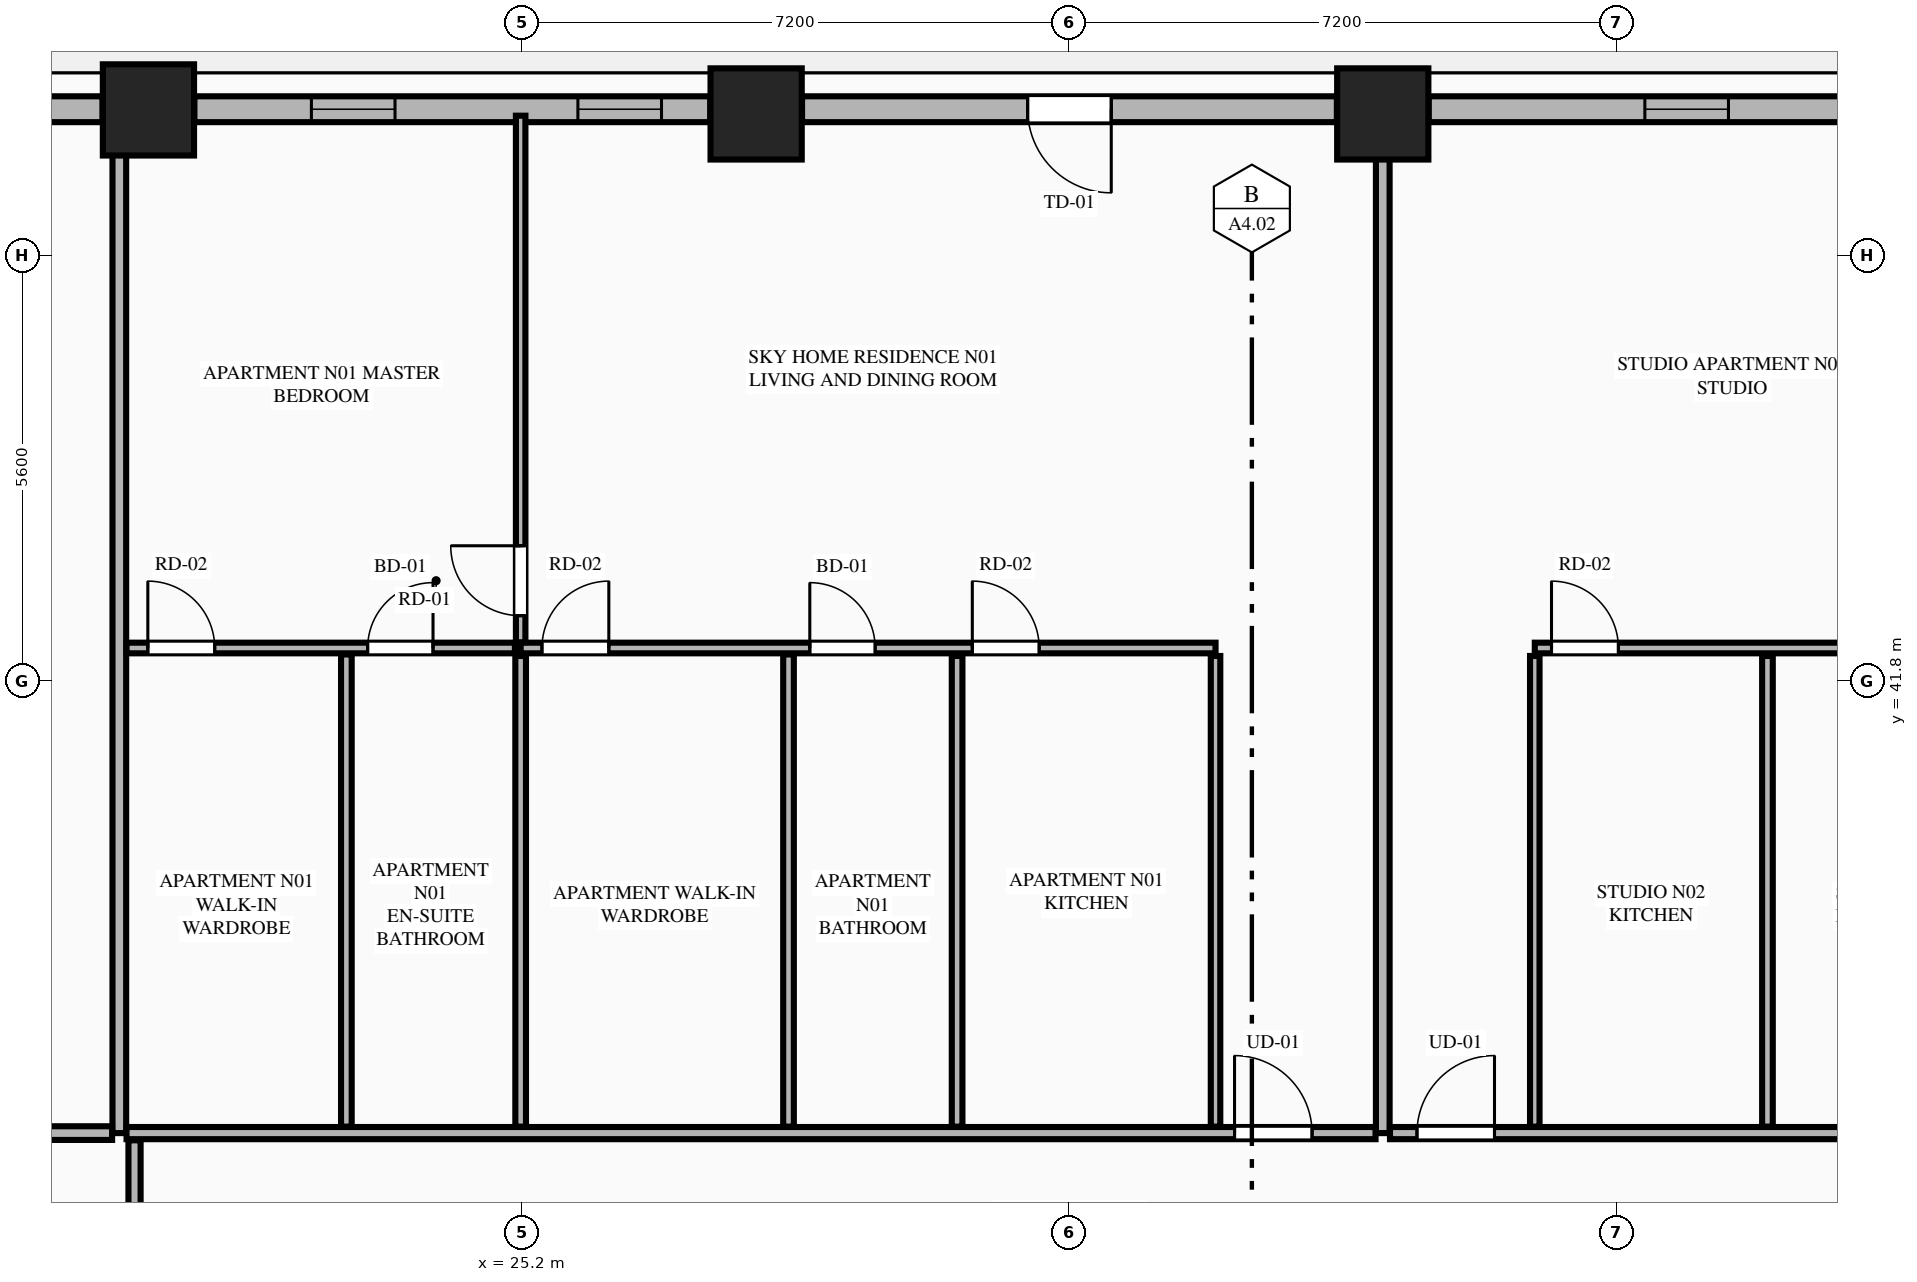
"""IFC4 building model, lengths in metres.
Left out: names, types, materials, properties, quantities, classifications, styles, units other than length and angle.
Written with IfcOpenShell. Run it as: python <this file> out.ifc"""

import sys

from ifc_helpers import new_model, si_unit, direction, frame, frame_2d, origin, origin_2d, place, context, subcontext, project, spatial, rectangle, extrude, element, fill, save


model = new_model("IFC4")
c1 = context("Model", 3, precision=1e-05, world=origin(), true_north=direction((0.0, 1.0)))
c2 = subcontext(c1, "Body", "Model", "MODEL_VIEW")
j1 = project(units=[si_unit("LENGTHUNIT", "METRE"), si_unit("PLANEANGLEUNIT", "RADIAN")], contexts=[c1])
p1 = place(None, origin())
s1 = spatial("IfcSite", under=j1, at=p1, CompositionType="ELEMENT")
p2 = place(p1, origin())
s2 = spatial("IfcBuilding", under=s1, at=p2, CompositionType="ELEMENT")
p3 = place(p2, frame((0.0, 0.0, 28.45)))
s3 = spatial("IfcBuildingStorey", under=s2, at=p3, CompositionType="ELEMENT", Elevation=28.45)
for number, where, z_axis, x_axis in (
    (1, (36.522, 49.258, 0.0), (0.0, 0.0, 1.0), (1.0, 0.0, 0.0)),
    (2, (28.278, 49.258, 0.0), (0.0, 0.0, 1.0), (1.0, 0.0, 0.0)),
    (3, (20.283, 49.311, 0.0), (0.0, 0.0, 1.0), (1.0, 0.0, 0.0)),
):
    element("IfcColumn", number, at=place(p3, frame(where, z_axis=z_axis, x_axis=x_axis)), inside=s3, PredefinedType="COLUMN", context=c2, shape_type="SweptSolid", body=[
        extrude(rectangle(XDim=1.2, YDim=1.2, at=origin_2d()), origin(), (0.0, 0.0, 1.0), 3.55),
    ])
p4 = place(p3, frame((43.913, 49.32, 0.0), z_axis=(0.0, 0.0, 1.0), x_axis=(-1.0, 0.0, 0.0)))
e4 = element("IfcWall", 4, at=p4, inside=s3, PredefinedType="STANDARD", context=c2, shape_type="SweptSolid", body=[
    extrude(rectangle(XDim=6.787, YDim=0.34, at=frame_2d((3.394, 0.0))), origin(), (0.0, 0.0, 1.0), 2.787),
])
p5 = place(p4, frame((2.843, 0.0, 0.75)))
e5 = element("IfcOpeningElement", 5, at=p5, cuts=e4, PredefinedType="OPENING", context=c2, shape_type="SweptSolid", body=[
    extrude(rectangle(XDim=1.1, YDim=1.887, at=frame_2d((0.55, 0.943))), frame((0.0, 0.18, 0.0), z_axis=(0.0, -1.0, 0.0), x_axis=(1.0, 0.0, 0.0)), (0.0, 0.0, 1.0), 0.36),
])
p6 = place(p3, frame((35.918, 49.32, 0.0), z_axis=(0.0, 0.0, 1.0), x_axis=(-1.0, 0.0, 0.0)))
e6 = element("IfcWall", 6, at=p6, inside=s3, PredefinedType="STANDARD", context=c2, shape_type="SweptSolid", body=[
    extrude(rectangle(XDim=7.036, YDim=0.34, at=frame_2d((3.518, 0.0))), origin(), (0.0, 0.0, 1.0), 2.787),
])
p7 = place(p6, frame((2.968, 0.0, 0.0)))
e7 = element("IfcOpeningElement", 7, at=p7, cuts=e6, PredefinedType="OPENING", context=c2, shape_type="SweptSolid", body=[
    extrude(rectangle(XDim=1.1, YDim=2.25, at=frame_2d((0.55, 1.125))), frame((0.0, 0.18, 0.0), z_axis=(0.0, -1.0, 0.0), x_axis=(1.0, 0.0, 0.0)), (0.0, 0.0, 1.0), 0.36),
])
p8 = place(p3, frame((27.674, 49.32, 0.0), z_axis=(0.0, 0.0, 1.0), x_axis=(-1.0, 0.0, 0.0)))
e8 = element("IfcWall", 8, at=p8, inside=s3, PredefinedType="STANDARD", context=c2, shape_type="SweptSolid", body=[
    extrude(rectangle(XDim=6.787, YDim=0.34, at=frame_2d((3.394, 0.0))), origin(), (0.0, 0.0, 1.0), 2.787),
])
p9 = place(p8, frame((0.641, 0.0, 0.75)))
e9 = element("IfcOpeningElement", 9, at=p9, cuts=e8, PredefinedType="OPENING", context=c2, shape_type="SweptSolid", body=[
    extrude(rectangle(XDim=1.1, YDim=1.887, at=frame_2d((0.55, 0.943))), frame((0.0, 0.18, 0.0), z_axis=(0.0, -1.0, 0.0), x_axis=(1.0, 0.0, 0.0)), (0.0, 0.0, 1.0), 0.36),
])
p10 = place(p8, frame((4.147, 0.0, 0.75)))
e10 = element("IfcOpeningElement", 10, at=p10, cuts=e8, PredefinedType="OPENING", context=c2, shape_type="SweptSolid", body=[
    extrude(rectangle(XDim=1.1, YDim=1.887, at=frame_2d((0.55, 0.943))), frame((0.0, 0.18, 0.0), z_axis=(0.0, -1.0, 0.0), x_axis=(1.0, 0.0, 0.0)), (0.0, 0.0, 1.0), 0.36),
])
p11 = place(p3, frame((19.679, 49.32, 0.0), z_axis=(0.0, 0.0, 1.0), x_axis=(-1.0, 0.0, 0.0)))
e11 = element("IfcWall", 11, at=p11, inside=s3, PredefinedType="STANDARD", context=c2, shape_type="SweptSolid", body=[
    extrude(rectangle(XDim=1.245, YDim=0.34, at=frame_2d((0.623, 0.0))), origin(), (0.0, 0.0, 1.0), 3.33),
])
p12 = place(p3, frame((19.9, 35.85, 0.0), z_axis=(0.0, 0.0, 1.0), x_axis=(0.0, 1.0, 0.0)))
e12 = element("IfcWall", 12, at=p12, inside=s3, PredefinedType="PARTITIONING", context=c2, shape_type="SweptSolid", body=[
    extrude(rectangle(XDim=13.295, YDim=0.18, at=frame_2d((6.647, 0.0))), origin(), (0.0, 0.0, 1.0), 3.33),
])
p13 = place(p3, frame((36.522, 35.85, 0.0), z_axis=(0.0, 0.0, 1.0), x_axis=(0.0, 1.0, 0.0)))
e13 = element("IfcWall", 13, at=p13, inside=s3, PredefinedType="PARTITIONING", context=c2, shape_type="SweptSolid", body=[
    extrude(rectangle(XDim=13.295, YDim=0.18, at=frame_2d((6.647, 0.0))), origin(), (0.0, 0.0, 1.0), 2.7),
])
p14 = place(p3, frame((19.995, 35.85, 0.0), z_axis=(0.0, 0.0, 1.0), x_axis=(1.0, 0.0, 0.0)))
e14 = element("IfcWall", 14, at=p14, inside=s3, PredefinedType="PARTITIONING", context=c2, shape_type="SweptSolid", body=[
    extrude(rectangle(XDim=16.432, YDim=0.16, at=frame_2d((8.216, 0.0))), origin(), (0.0, 0.0, 1.0), 3.33),
])
p15 = place(p14, frame((14.577, 0.0, 0.0)))
e15 = element("IfcOpeningElement", 15, at=p15, cuts=e14, PredefinedType="OPENING", context=c2, shape_type="SweptSolid", body=[
    extrude(rectangle(XDim=1.02, YDim=2.25, at=frame_2d((0.51, 1.125))), frame((0.0, 0.09, 0.0), z_axis=(0.0, -1.0, 0.0), x_axis=(1.0, 0.0, 0.0)), (0.0, 0.0, 1.0), 0.18),
])
p16 = place(p3, frame((34.322, 35.935, 0.0), z_axis=(0.0, 0.0, 1.0), x_axis=(0.0, 1.0, 0.0)))
e16 = element("IfcWall", 16, at=p16, inside=s3, PredefinedType="PARTITIONING", context=c2, shape_type="SweptSolid", body=[
    extrude(rectangle(XDim=6.192, YDim=0.125, at=frame_2d((3.096, 0.0))), origin(), (0.0, 0.0, 1.0), 3.33),
])
p17 = place(p3, frame((25.18, 42.232, 0.0), z_axis=(0.0, 0.0, 1.0), x_axis=(1.0, 0.0, 0.0)))
e17 = element("IfcWall", 17, at=p17, inside=s3, PredefinedType="PLUMBINGWALL", context=c2, shape_type="SweptSolid", body=[
    extrude(rectangle(XDim=9.142, YDim=0.14, at=frame_2d((4.571, 0.0))), origin(), (0.0, 0.0, 1.0), 3.33),
])
p18 = place(p17, frame((0.28, 0.0, 0.0)))
e18 = element("IfcOpeningElement", 18, at=p18, cuts=e17, PredefinedType="OPENING", context=c2, shape_type="SweptSolid", body=[
    extrude(rectangle(XDim=0.88, YDim=2.15, at=frame_2d((0.44, 1.075))), frame((0.0, 0.08, 0.0), z_axis=(0.0, -1.0, 0.0), x_axis=(1.0, 0.0, 0.0)), (0.0, 0.0, 1.0), 0.16),
])
p19 = place(p17, frame((3.804, 0.0, 0.0)))
e19 = element("IfcOpeningElement", 19, at=p19, cuts=e17, PredefinedType="OPENING", context=c2, shape_type="SweptSolid", body=[
    extrude(rectangle(XDim=0.86, YDim=2.1, at=frame_2d((0.43, 1.05))), frame((0.0, 0.08, 0.0), z_axis=(0.0, -1.0, 0.0), x_axis=(1.0, 0.0, 0.0)), (0.0, 0.0, 1.0), 0.16),
])
p20 = place(p17, frame((5.942, 0.0, 0.0)))
e20 = element("IfcOpeningElement", 20, at=p20, cuts=e17, PredefinedType="OPENING", context=c2, shape_type="SweptSolid", body=[
    extrude(rectangle(XDim=0.88, YDim=2.15, at=frame_2d((0.44, 1.075))), frame((0.0, 0.08, 0.0), z_axis=(0.0, -1.0, 0.0), x_axis=(1.0, 0.0, 0.0)), (0.0, 0.0, 1.0), 0.16),
])
p21 = place(p3, frame((19.995, 42.232, 0.0), z_axis=(0.0, 0.0, 1.0), x_axis=(1.0, 0.0, 0.0)))
e21 = element("IfcWall", 21, at=p21, inside=s3, PredefinedType="PLUMBINGWALL", context=c2, shape_type="SweptSolid", body=[
    extrude(rectangle(XDim=5.11, YDim=0.14, at=frame_2d((2.555, 0.0))), origin(), (0.0, 0.0, 1.0), 3.33),
])
p22 = place(p21, frame((0.28, 0.0, 0.0)))
e22 = element("IfcOpeningElement", 22, at=p22, cuts=e21, PredefinedType="OPENING", context=c2, shape_type="SweptSolid", body=[
    extrude(rectangle(XDim=0.88, YDim=2.15, at=frame_2d((0.44, 1.075))), frame((0.0, 0.08, 0.0), z_axis=(0.0, -1.0, 0.0), x_axis=(1.0, 0.0, 0.0)), (0.0, 0.0, 1.0), 0.16),
])
p23 = place(p21, frame((3.172, 0.0, 0.0)))
e23 = element("IfcOpeningElement", 23, at=p23, cuts=e21, PredefinedType="OPENING", context=c2, shape_type="SweptSolid", body=[
    extrude(rectangle(XDim=0.86, YDim=2.1, at=frame_2d((0.43, 1.05))), frame((0.0, 0.08, 0.0), z_axis=(0.0, -1.0, 0.0), x_axis=(1.0, 0.0, 0.0)), (0.0, 0.0, 1.0), 0.16),
])
for number, where, z_axis, x_axis in (
    (24, (30.922, 35.935, 0.0), (0.0, 0.0, 1.0), (0.0, 1.0, 0.0)),
    (25, (25.18, 35.935, 0.0), (0.0, 0.0, 1.0), (0.0, 1.0, 0.0)),
):
    element("IfcWall", number, at=place(p3, frame(where, z_axis=z_axis, x_axis=x_axis)), inside=s3, PredefinedType="PLUMBINGWALL", context=c2, shape_type="SweptSolid", body=[
        extrude(rectangle(XDim=6.192, YDim=0.14, at=frame_2d((3.096, 0.0))), origin(), (0.0, 0.0, 1.0), 3.33),
    ])
p24 = place(p3, frame((25.18, 42.307, 0.0), z_axis=(0.0, 0.0, 1.0), x_axis=(0.0, 1.0, 0.0)))
e26 = element("IfcWall", 26, at=p24, inside=s3, PredefinedType="PARTITIONING", context=c2, shape_type="SweptSolid", body=[
    extrude(rectangle(XDim=6.928, YDim=0.125, at=frame_2d((3.464, 0.0))), origin(), (0.0, 0.0, 1.0), 3.33),
])
p25 = place(p24, frame((0.35, 0.0, 0.0)))
e27 = element("IfcOpeningElement", 27, at=p25, cuts=e26, PredefinedType="OPENING", context=c2, shape_type="SweptSolid", body=[
    extrude(rectangle(XDim=0.92, YDim=2.15, at=frame_2d((0.46, 1.075))), frame((0.0, 0.073, 0.0), z_axis=(0.0, -1.0, 0.0), x_axis=(1.0, 0.0, 0.0)), (0.0, 0.0, 1.0), 0.145),
])
p26 = place(p3, frame((28.704, 35.935, 0.0), z_axis=(0.0, 0.0, 1.0), x_axis=(0.0, 1.0, 0.0)))
e28 = element("IfcWall", 28, at=p26, inside=s3, PredefinedType="PLUMBINGWALL", context=c2, shape_type="SweptSolid", body=[
    extrude(rectangle(XDim=6.212, YDim=0.14, at=frame_2d((3.106, 0.0))), origin(), (0.0, 0.0, 1.0), 3.33),
])
p27 = place(p3, frame((22.887, 35.935, 0.0), z_axis=(0.0, 0.0, 1.0), x_axis=(0.0, 1.0, 0.0)))
e29 = element("IfcWall", 29, at=p27, inside=s3, PredefinedType="PLUMBINGWALL", context=c2, shape_type="SweptSolid", body=[
    extrude(rectangle(XDim=6.212, YDim=0.14, at=frame_2d((3.106, 0.0))), origin(), (0.0, 0.0, 1.0), 2.7),
])
p28 = place(p3, frame((36.617, 35.85, 0.0), z_axis=(0.0, 0.0, 1.0), x_axis=(1.0, 0.0, 0.0)))
e30 = element("IfcWall", 30, at=p28, inside=s3, PredefinedType="PARTITIONING", context=c2, shape_type="SweptSolid", body=[
    extrude(rectangle(XDim=8.188, YDim=0.16, at=frame_2d((4.094, 0.0))), origin(), (0.0, 0.0, 1.0), 3.33),
])
p29 = place(p28, frame((0.355, 0.0, 0.0)))
e31 = element("IfcOpeningElement", 31, at=p29, cuts=e30, PredefinedType="OPENING", context=c2, shape_type="SweptSolid", body=[
    extrude(rectangle(XDim=1.02, YDim=2.25, at=frame_2d((0.51, 1.125))), frame((0.0, 0.09, 0.0), z_axis=(0.0, -1.0, 0.0), x_axis=(1.0, 0.0, 0.0)), (0.0, 0.0, 1.0), 0.18),
])
p30 = place(p3, frame((38.522, 35.935, 0.0), z_axis=(0.0, 0.0, 1.0), x_axis=(0.0, 1.0, 0.0)))
e32 = element("IfcWall", 32, at=p30, inside=s3, PredefinedType="PARTITIONING", context=c2, shape_type="SweptSolid", body=[
    extrude(rectangle(XDim=6.192, YDim=0.125, at=frame_2d((3.096, 0.0))), origin(), (0.0, 0.0, 1.0), 3.33),
])
p31 = place(p3, frame((38.522, 42.232, 0.0), z_axis=(0.0, 0.0, 1.0), x_axis=(1.0, 0.0, 0.0)))
e33 = element("IfcWall", 33, at=p31, inside=s3, PredefinedType="PLUMBINGWALL", context=c2, shape_type="SweptSolid", body=[
    extrude(rectangle(XDim=6.283, YDim=0.14, at=frame_2d((3.142, 0.0))), origin(), (0.0, 0.0, 1.0), 3.33),
])
p32 = place(p31, frame((4.247, 0.0, 0.0)))
e34 = element("IfcOpeningElement", 34, at=p32, cuts=e33, PredefinedType="OPENING", context=c2, shape_type="SweptSolid", body=[
    extrude(rectangle(XDim=0.86, YDim=2.1, at=frame_2d((0.43, 1.05))), frame((0.0, 0.08, 0.0), z_axis=(0.0, -1.0, 0.0), x_axis=(1.0, 0.0, 0.0)), (0.0, 0.0, 1.0), 0.16),
])
p33 = place(p31, frame((0.22, 0.0, 0.0)))
e35 = element("IfcOpeningElement", 35, at=p33, cuts=e33, PredefinedType="OPENING", context=c2, shape_type="SweptSolid", body=[
    extrude(rectangle(XDim=0.88, YDim=2.15, at=frame_2d((0.44, 1.075))), frame((0.0, 0.08, 0.0), z_axis=(0.0, -1.0, 0.0), x_axis=(1.0, 0.0, 0.0)), (0.0, 0.0, 1.0), 0.16),
])
p34 = place(p3, frame((41.583, 35.935, 0.0), z_axis=(0.0, 0.0, 1.0), x_axis=(0.0, 1.0, 0.0)))
e36 = element("IfcWall", 36, at=p34, inside=s3, PredefinedType="PLUMBINGWALL", context=c2, shape_type="SweptSolid", body=[
    extrude(rectangle(XDim=6.192, YDim=0.14, at=frame_2d((3.096, 0.0))), origin(), (0.0, 0.0, 1.0), 3.33),
])
p35 = place(p3, frame((10.665, 35.85, 0.0), z_axis=(0.0, 0.0, 1.0), x_axis=(1.0, 0.0, 0.0)))
e37 = element("IfcWall", 37, at=p35, inside=s3, PredefinedType="PARTITIONING", context=c2, shape_type="SweptSolid", body=[
    extrude(rectangle(XDim=9.14, YDim=0.18, at=frame_2d((4.57, 0.0))), origin(), (0.0, 0.0, 1.0), 3.33),
])
p36 = place(p3, frame((20.1, 25.995, 0.0), z_axis=(0.0, 0.0, 1.0), x_axis=(0.0, 1.0, 0.0)))
e38 = element("IfcWall", 38, at=p36, inside=s3, PredefinedType="PARTITIONING", context=c2, shape_type="SweptSolid", body=[
    extrude(rectangle(XDim=9.76, YDim=0.16, at=frame_2d((4.88, 0.0))), origin(), (0.0, 0.0, 1.0), 2.7),
])
p37 = place(p36, frame((0.45, 0.0, 0.0)))
e39 = element("IfcOpeningElement", 39, at=p37, cuts=e38, PredefinedType="OPENING", context=c2, shape_type="SweptSolid", body=[
    extrude(rectangle(XDim=1.02, YDim=2.25, at=frame_2d((0.51, 1.125))), frame((0.0, 0.09, 0.0), z_axis=(0.0, -1.0, 0.0), x_axis=(1.0, 0.0, 0.0)), (0.0, 0.0, 1.0), 0.18),
])
p38 = place(p5, origin())
e40 = element("IfcWindow", 40, at=p38, inside=s3, PartitioningType="SINGLE_PANEL", PredefinedType="WINDOW", context=c2, shape_type="SweptSolid", body=[
    extrude(rectangle(XDim=1.1, YDim=1.887, at=frame_2d((0.55, 0.943))), frame((0.0, 0.03, 0.0), z_axis=(0.0, -1.0, 0.0), x_axis=(1.0, 0.0, 0.0)), (0.0, 0.0, 1.0), 0.06),
])
fill(e5, e40)
p39 = place(p7, origin())
e41 = element("IfcDoor", 41, at=p39, inside=s3, OperationType="SINGLE_SWING_LEFT", PredefinedType="DOOR", context=c2, shape_type="SweptSolid", body=[
    extrude(rectangle(XDim=1.1, YDim=2.25, at=frame_2d((0.55, 1.125))), frame((0.0, 0.025, 0.0), z_axis=(0.0, -1.0, 0.0), x_axis=(1.0, 0.0, 0.0)), (0.0, 0.0, 1.0), 0.05),
])
fill(e7, e41)
p40 = place(p9, origin())
e42 = element("IfcWindow", 42, at=p40, inside=s3, PartitioningType="SINGLE_PANEL", PredefinedType="WINDOW", context=c2, shape_type="SweptSolid", body=[
    extrude(rectangle(XDim=1.1, YDim=1.887, at=frame_2d((0.55, 0.943))), frame((0.0, 0.03, 0.0), z_axis=(0.0, -1.0, 0.0), x_axis=(1.0, 0.0, 0.0)), (0.0, 0.0, 1.0), 0.06),
])
fill(e9, e42)
p41 = place(p18, origin())
e43 = element("IfcDoor", 43, at=p41, inside=s3, OperationType="SINGLE_SWING_RIGHT", PredefinedType="DOOR", context=c2, shape_type="SweptSolid", body=[
    extrude(rectangle(XDim=0.88, YDim=2.15, at=frame_2d((0.44, 1.075))), frame((0.0, 0.025, 0.0), z_axis=(0.0, -1.0, 0.0), x_axis=(1.0, 0.0, 0.0)), (0.0, 0.0, 1.0), 0.05),
])
fill(e18, e43)
p42 = place(p19, origin())
e44 = element("IfcDoor", 44, at=p42, inside=s3, OperationType="SINGLE_SWING_LEFT", PredefinedType="DOOR", context=c2, shape_type="SweptSolid", body=[
    extrude(rectangle(XDim=0.86, YDim=2.1, at=frame_2d((0.43, 1.05))), frame((0.0, 0.025, 0.0), z_axis=(0.0, -1.0, 0.0), x_axis=(1.0, 0.0, 0.0)), (0.0, 0.0, 1.0), 0.05),
])
fill(e19, e44)
p43 = place(p22, origin())
e45 = element("IfcDoor", 45, at=p43, inside=s3, OperationType="SINGLE_SWING_LEFT", PredefinedType="DOOR", context=c2, shape_type="SweptSolid", body=[
    extrude(rectangle(XDim=0.88, YDim=2.15, at=frame_2d((0.44, 1.075))), frame((0.0, 0.025, 0.0), z_axis=(0.0, -1.0, 0.0), x_axis=(1.0, 0.0, 0.0)), (0.0, 0.0, 1.0), 0.05),
])
fill(e22, e45)
p44 = place(p23, origin())
e46 = element("IfcDoor", 46, at=p44, inside=s3, OperationType="SINGLE_SWING_RIGHT", PredefinedType="DOOR", context=c2, shape_type="SweptSolid", body=[
    extrude(rectangle(XDim=0.86, YDim=2.1, at=frame_2d((0.43, 1.05))), frame((0.0, 0.025, 0.0), z_axis=(0.0, -1.0, 0.0), x_axis=(1.0, 0.0, 0.0)), (0.0, 0.0, 1.0), 0.05),
])
fill(e23, e46)
p45 = place(p15, origin())
e47 = element("IfcDoor", 47, at=p45, inside=s3, OperationType="SINGLE_SWING_LEFT", PredefinedType="DOOR", context=c2, shape_type="SweptSolid", body=[
    extrude(rectangle(XDim=1.02, YDim=2.25, at=frame_2d((0.51, 1.125))), frame((0.0, 0.025, 0.0), z_axis=(0.0, -1.0, 0.0), x_axis=(1.0, 0.0, 0.0)), (0.0, 0.0, 1.0), 0.05),
])
fill(e15, e47)
p46 = place(p20, origin())
e48 = element("IfcDoor", 48, at=p46, inside=s3, OperationType="SINGLE_SWING_LEFT", PredefinedType="DOOR", context=c2, shape_type="SweptSolid", body=[
    extrude(rectangle(XDim=0.88, YDim=2.15, at=frame_2d((0.44, 1.075))), frame((0.0, 0.025, 0.0), z_axis=(0.0, -1.0, 0.0), x_axis=(1.0, 0.0, 0.0)), (0.0, 0.0, 1.0), 0.05),
])
fill(e20, e48)
p47 = place(p25, origin())
e49 = element("IfcDoor", 49, at=p47, inside=s3, OperationType="SINGLE_SWING_RIGHT", PredefinedType="DOOR", context=c2, shape_type="SweptSolid", body=[
    extrude(rectangle(XDim=0.92, YDim=2.15, at=frame_2d((0.46, 1.075))), frame((0.0, 0.025, 0.0), z_axis=(0.0, -1.0, 0.0), x_axis=(1.0, 0.0, 0.0)), (0.0, 0.0, 1.0), 0.05),
])
fill(e27, e49)
p48 = place(p29, origin())
e50 = element("IfcDoor", 50, at=p48, inside=s3, OperationType="SINGLE_SWING_RIGHT", PredefinedType="DOOR", context=c2, shape_type="SweptSolid", body=[
    extrude(rectangle(XDim=1.02, YDim=2.25, at=frame_2d((0.51, 1.125))), frame((0.0, 0.025, 0.0), z_axis=(0.0, -1.0, 0.0), x_axis=(1.0, 0.0, 0.0)), (0.0, 0.0, 1.0), 0.05),
])
fill(e31, e50)
p49 = place(p33, origin())
e51 = element("IfcDoor", 51, at=p49, inside=s3, OperationType="SINGLE_SWING_LEFT", PredefinedType="DOOR", context=c2, shape_type="SweptSolid", body=[
    extrude(rectangle(XDim=0.88, YDim=2.15, at=frame_2d((0.44, 1.075))), frame((0.0, 0.025, 0.0), z_axis=(0.0, -1.0, 0.0), x_axis=(1.0, 0.0, 0.0)), (0.0, 0.0, 1.0), 0.05),
])
fill(e35, e51)
p50 = place(p10, origin())
e52 = element("IfcWindow", 52, at=p50, inside=s3, PartitioningType="SINGLE_PANEL", PredefinedType="WINDOW", context=c2, shape_type="SweptSolid", body=[
    extrude(rectangle(XDim=1.1, YDim=1.887, at=frame_2d((0.55, 0.943))), frame((0.0, 0.03, 0.0), z_axis=(0.0, -1.0, 0.0), x_axis=(1.0, 0.0, 0.0)), (0.0, 0.0, 1.0), 0.06),
])
fill(e10, e52)
save(model, sys.argv[1])
